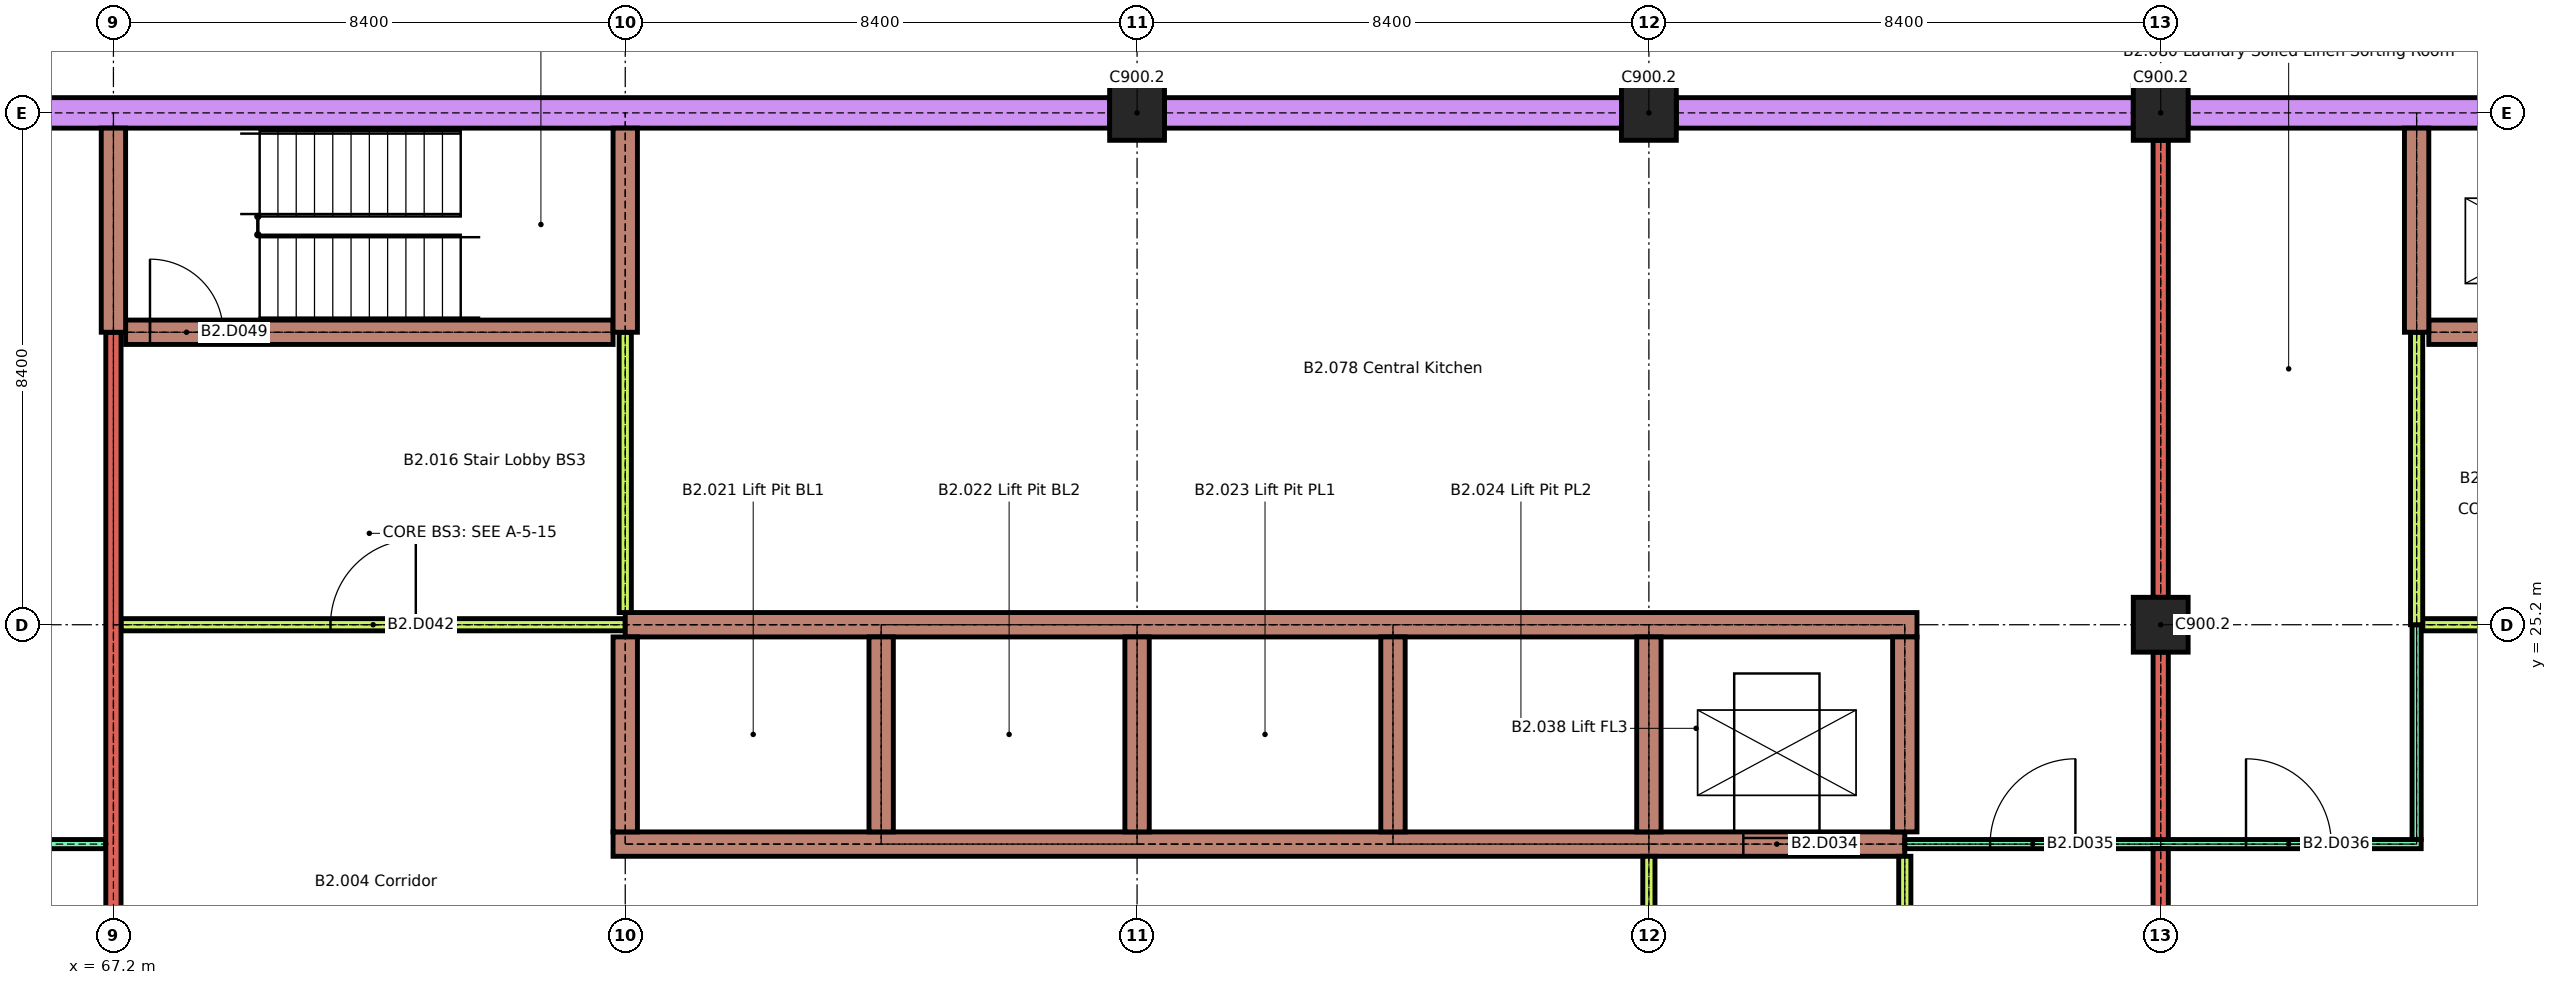
"""IFC4 building model, lengths in metres.
Left out: names, types, materials, properties, quantities, classifications, styles, units other than length and angle.
Written with IfcOpenShell. Run it as: python <this file> out.ifc"""

import sys

from ifc_helpers import new_model, si_unit, direction, frame, frame_2d, origin, origin_2d, place, context, subcontext, project, spatial, rectangle, extrude, element, fill, save


model = new_model("IFC4")
c1 = context("Model", 3, precision=1e-05, world=origin(), true_north=direction((0.0, 1.0)))
c2 = subcontext(c1, "Body", "Model", "MODEL_VIEW")
j1 = project(units=[si_unit("LENGTHUNIT", "METRE"), si_unit("PLANEANGLEUNIT", "RADIAN")], contexts=[c1])
p1 = place(None, origin())
s1 = spatial("IfcSite", under=j1, at=p1, CompositionType="ELEMENT")
p2 = place(p1, origin())
s2 = spatial("IfcBuilding", under=s1, at=p2, CompositionType="ELEMENT")
p3 = place(p2, frame((0.0, 0.0, -7.8)))
s3 = spatial("IfcBuildingStorey", under=s2, at=p3, CompositionType="ELEMENT", Elevation=-7.8)
for number, where, z_axis, x_axis in (
    (1, (100.8, 25.2, 0.0), (0.0, 0.0, 1.0), (1.0, 0.0, 0.0)),
    (2, (84.0, 33.6, 0.0), (0.0, 0.0, 1.0), (1.0, 0.0, 0.0)),
    (3, (92.4, 33.6, 0.0), (0.0, 0.0, 1.0), (1.0, 0.0, 0.0)),
    (4, (100.8, 33.6, 0.0), (0.0, 0.0, 1.0), (1.0, 0.0, 0.0)),
):
    element("IfcColumn", number, at=place(p3, frame(where, z_axis=z_axis, x_axis=x_axis)), inside=s3, PredefinedType="COLUMN", context=c2, shape_type="SweptSolid", body=[
        extrude(rectangle(XDim=0.9, YDim=0.9, at=origin_2d()), origin(), (0.0, 0.0, 1.0), 3.1),
    ])
p4 = place(p3, frame((42.45, 33.6, 0.0), z_axis=(0.0, 0.0, 1.0), x_axis=(1.0, 0.0, 0.0)))
e5 = element("IfcWall", 5, at=p4, inside=s3, PredefinedType="SOLIDWALL", context=c2, shape_type="SweptSolid", body=[
    extrude(rectangle(XDim=41.1, YDim=0.5, at=frame_2d((20.55, 0.0))), origin(), (0.0, 0.0, 1.0), 3.1),
])
for number, where, z_axis, x_axis in (
    (6, (84.45, 33.6, 0.0), (0.0, 0.0, 1.0), (1.0, 0.0, 0.0)),
    (7, (92.85, 33.6, 0.0), (0.0, 0.0, 1.0), (1.0, 0.0, 0.0)),
):
    element("IfcWall", number, at=place(p3, frame(where, z_axis=z_axis, x_axis=x_axis)), inside=s3, PredefinedType="SOLIDWALL", context=c2, shape_type="SweptSolid", body=[
        extrude(rectangle(XDim=7.5, YDim=0.5, at=frame_2d((3.75, 0.0))), origin(), (0.0, 0.0, 1.0), 3.1),
    ])
p5 = place(p3, frame((101.25, 33.6, 0.0), z_axis=(0.0, 0.0, 1.0), x_axis=(1.0, 0.0, 0.0)))
e8 = element("IfcWall", 8, at=p5, inside=s3, PredefinedType="SOLIDWALL", context=c2, shape_type="SweptSolid", body=[
    extrude(rectangle(XDim=32.7, YDim=0.5, at=frame_2d((16.35, 0.0))), origin(), (0.0, 0.0, 1.0), 3.1),
])
p6 = place(p3, frame((58.725, 21.6, 0.0), z_axis=(0.0, 0.0, 1.0), x_axis=(1.0, 0.0, 0.0)))
e9 = element("IfcWall", 9, at=p6, inside=s3, PredefinedType="PARTITIONING", context=c2, shape_type="SweptSolid", body=[
    extrude(rectangle(XDim=8.35, YDim=0.15, at=frame_2d((4.175, 0.0))), origin(), (0.0, 0.0, 1.0), 3.1),
])
p7 = place(p6, frame((3.512, 0.0, 0.0)))
e10 = element("IfcOpeningElement", 10, at=p7, cuts=e9, PredefinedType="OPENING", context=c2, shape_type="SweptSolid", body=[
    extrude(rectangle(XDim=1.4, YDim=2.1, at=frame_2d((0.7, 1.05))), frame((0.0, 0.085, 0.0), z_axis=(0.0, -1.0, 0.0), x_axis=(1.0, 0.0, 0.0)), (0.0, 0.0, 1.0), 0.17),
])
p8 = place(p3, frame((75.4, 21.6, 0.0), z_axis=(0.0, 0.0, 1.0), x_axis=(1.0, 0.0, 0.0)))
e11 = element("IfcWall", 11, at=p8, inside=s3, PredefinedType="SHEAR", context=c2, shape_type="SweptSolid", body=[
    extrude(rectangle(XDim=21.2, YDim=0.4, at=frame_2d((10.6, 0.0))), origin(), (0.0, 0.0, 1.0), 3.1),
])
p9 = place(p8, frame((18.55, 0.0, 0.0)))
e12 = element("IfcOpeningElement", 12, at=p9, cuts=e11, PredefinedType="OPENING", context=c2, shape_type="SweptSolid", body=[
    extrude(rectangle(XDim=1.1, YDim=2.1, at=frame_2d((0.55, 1.05))), frame((0.0, 0.21, 0.0), z_axis=(0.0, -1.0, 0.0), x_axis=(1.0, 0.0, 0.0)), (0.0, 0.0, 1.0), 0.42),
])
p10 = place(p3, frame((96.6, 21.6, 0.0), z_axis=(0.0, 0.0, 1.0), x_axis=(1.0, 0.0, 0.0)))
e13 = element("IfcWall", 13, at=p10, inside=s3, PredefinedType="PARTITIONING", context=c2, shape_type="SweptSolid", body=[
    extrude(rectangle(XDim=8.475, YDim=0.15, at=frame_2d((4.237, 0.0))), origin(), (0.0, 0.0, 1.0), 3.1),
])
p11 = place(p10, frame((1.4, 0.0, 0.0)))
e14 = element("IfcOpeningElement", 14, at=p11, cuts=e13, PredefinedType="OPENING", context=c2, shape_type="SweptSolid", body=[
    extrude(rectangle(XDim=1.4, YDim=2.1, at=frame_2d((0.7, 1.05))), frame((0.0, 0.085, 0.0), z_axis=(0.0, -1.0, 0.0), x_axis=(1.0, 0.0, 0.0)), (0.0, 0.0, 1.0), 0.17),
])
p12 = place(p10, frame((5.6, 0.0, 0.0)))
e15 = element("IfcOpeningElement", 15, at=p12, cuts=e13, PredefinedType="OPENING", context=c2, shape_type="SweptSolid", body=[
    extrude(rectangle(XDim=1.4, YDim=2.1, at=frame_2d((0.7, 1.05))), frame((0.0, 0.085, 0.0), z_axis=(0.0, -1.0, 0.0), x_axis=(1.0, 0.0, 0.0)), (0.0, 0.0, 1.0), 0.17),
])
p13 = place(p3, frame((67.325, 25.2, 0.0), z_axis=(0.0, 0.0, 1.0), x_axis=(1.0, 0.0, 0.0)))
e16 = element("IfcWall", 16, at=p13, inside=s3, PredefinedType="PARTITIONING", context=c2, shape_type="SweptSolid", body=[
    extrude(rectangle(XDim=8.275, YDim=0.2, at=frame_2d((4.138, 0.0))), origin(), (0.0, 0.0, 1.0), 3.1),
])
p14 = place(p13, frame((3.438, 0.0, 0.0)))
e17 = element("IfcOpeningElement", 17, at=p14, cuts=e16, PredefinedType="OPENING", context=c2, shape_type="SweptSolid", body=[
    extrude(rectangle(XDim=1.4, YDim=2.1, at=frame_2d((0.7, 1.05))), frame((0.0, 0.11, 0.0), z_axis=(0.0, -1.0, 0.0), x_axis=(1.0, 0.0, 0.0)), (0.0, 0.0, 1.0), 0.22),
])
p15 = place(p3, frame((75.6, 25.2, 0.0), z_axis=(0.0, 0.0, 1.0), x_axis=(1.0, 0.0, 0.0)))
e18 = element("IfcWall", 18, at=p15, inside=s3, PredefinedType="SHEAR", context=c2, shape_type="SweptSolid", body=[
    extrude(rectangle(XDim=21.2, YDim=0.4, at=frame_2d((10.6, 0.0))), origin(), (0.0, 0.0, 1.0), 3.1),
])
p16 = place(p3, frame((105.1, 25.2, 0.0), z_axis=(0.0, 0.0, 1.0), x_axis=(1.0, 0.0, 0.0)))
e19 = element("IfcWall", 19, at=p16, inside=s3, PredefinedType="PARTITIONING", context=c2, shape_type="SweptSolid", body=[
    extrude(rectangle(XDim=4.0, YDim=0.2, at=frame_2d((2.0, 0.0))), origin(), (0.0, 0.0, 1.0), 3.1),
])
p17 = place(p16, frame((1.0, 0.0, 0.0)))
e20 = element("IfcOpeningElement", 20, at=p17, cuts=e19, PredefinedType="OPENING", context=c2, shape_type="SweptSolid", body=[
    extrude(rectangle(XDim=2.0, YDim=2.4, at=frame_2d((1.0, 1.2))), frame((0.0, 0.11, 0.0), z_axis=(0.0, -1.0, 0.0), x_axis=(1.0, 0.0, 0.0)), (0.0, 0.0, 1.0), 0.22),
])
p18 = place(p3, frame((67.4, 30.0, 0.0), z_axis=(0.0, 0.0, 1.0), x_axis=(1.0, 0.0, 0.0)))
e21 = element("IfcWall", 21, at=p18, inside=s3, PredefinedType="SHEAR", context=c2, shape_type="SweptSolid", body=[
    extrude(rectangle(XDim=8.0, YDim=0.4, at=frame_2d((4.0, 0.0))), origin(), (0.0, 0.0, 1.0), 3.1),
])
p19 = place(p18, frame((0.4, 0.0, 0.0)))
e22 = element("IfcOpeningElement", 22, at=p19, cuts=e21, PredefinedType="OPENING", context=c2, shape_type="SweptSolid", body=[
    extrude(rectangle(XDim=1.2, YDim=2.1, at=frame_2d((0.6, 1.05))), frame((0.0, 0.21, 0.0), z_axis=(0.0, -1.0, 0.0), x_axis=(1.0, 0.0, 0.0)), (0.0, 0.0, 1.0), 0.42),
])
p20 = place(p3, frame((105.2, 30.0, 0.0), z_axis=(0.0, 0.0, 1.0), x_axis=(1.0, 0.0, 0.0)))
e23 = element("IfcWall", 23, at=p20, inside=s3, PredefinedType="SHEAR", context=c2, shape_type="SweptSolid", body=[
    extrude(rectangle(XDim=3.8, YDim=0.4, at=frame_2d((1.9, 0.0))), origin(), (0.0, 0.0, 1.0), 3.1),
])
p21 = place(p20, frame((1.35, 0.0, 0.0)))
e24 = element("IfcOpeningElement", 24, at=p21, cuts=e23, PredefinedType="OPENING", context=c2, shape_type="SweptSolid", body=[
    extrude(rectangle(XDim=1.1, YDim=2.1, at=frame_2d((0.55, 1.05))), frame((0.0, 0.21, 0.0), z_axis=(0.0, -1.0, 0.0), x_axis=(1.0, 0.0, 0.0)), (0.0, 0.0, 1.0), 0.42),
])
p22 = place(p3, frame((67.2, 17.25, 0.0), z_axis=(0.0, 0.0, 1.0), x_axis=(0.0, 1.0, 0.0)))
e25 = element("IfcWall", 25, at=p22, inside=s3, PredefinedType="SOLIDWALL", context=c2, shape_type="SweptSolid", body=[
    extrude(rectangle(XDim=12.75, YDim=0.25, at=frame_2d((6.375, 0.0))), origin(), (0.0, 0.0, 1.0), 3.1),
])
p23 = place(p22, frame((1.175, 0.0, 0.0)))
e26 = element("IfcOpeningElement", 26, at=p23, cuts=e25, PredefinedType="OPENING", context=c2, shape_type="SweptSolid", body=[
    extrude(rectangle(XDim=2.0, YDim=2.4, at=frame_2d((1.0, 1.2))), frame((0.0, 0.135, 0.0), z_axis=(0.0, -1.0, 0.0), x_axis=(1.0, 0.0, 0.0)), (0.0, 0.0, 1.0), 0.27),
])
p24 = place(p3, frame((67.2, 30.0, 0.0), z_axis=(0.0, 0.0, 1.0), x_axis=(0.0, 1.0, 0.0)))
e27 = element("IfcWall", 27, at=p24, inside=s3, PredefinedType="SHEAR", context=c2, shape_type="SweptSolid", body=[
    extrude(rectangle(XDim=3.35, YDim=0.4, at=frame_2d((1.675, 0.0))), origin(), (0.0, 0.0, 1.0), 3.1),
])
p25 = place(p3, frame((75.6, 21.8, 0.0), z_axis=(0.0, 0.0, 1.0), x_axis=(0.0, 1.0, 0.0)))
e28 = element("IfcWall", 28, at=p25, inside=s3, PredefinedType="SHEAR", context=c2, shape_type="SweptSolid", body=[
    extrude(rectangle(XDim=3.2, YDim=0.4, at=frame_2d((1.6, 0.0))), origin(), (0.0, 0.0, 1.0), 3.1),
])
p26 = place(p3, frame((75.6, 25.4, 0.0), z_axis=(0.0, 0.0, 1.0), x_axis=(0.0, 1.0, 0.0)))
e29 = element("IfcWall", 29, at=p26, inside=s3, PredefinedType="PARTITIONING", context=c2, shape_type="SweptSolid", body=[
    extrude(rectangle(XDim=4.6, YDim=0.2, at=frame_2d((2.3, 0.0))), origin(), (0.0, 0.0, 1.0), 3.1),
])
p27 = place(p3, frame((75.6, 30.0, 0.0), z_axis=(0.0, 0.0, 1.0), x_axis=(0.0, 1.0, 0.0)))
e30 = element("IfcWall", 30, at=p27, inside=s3, PredefinedType="SHEAR", context=c2, shape_type="SweptSolid", body=[
    extrude(rectangle(XDim=3.35, YDim=0.4, at=frame_2d((1.675, 0.0))), origin(), (0.0, 0.0, 1.0), 3.1),
])
for number, where, z_axis, x_axis in (
    (31, (79.8, 21.8, 0.0), (0.0, 0.0, 1.0), (0.0, 1.0, 0.0)),
    (32, (84.0, 21.8, 0.0), (0.0, 0.0, 1.0), (0.0, 1.0, 0.0)),
    (33, (88.2, 21.8, 0.0), (0.0, 0.0, 1.0), (0.0, 1.0, 0.0)),
):
    element("IfcWall", number, at=place(p3, frame(where, z_axis=z_axis, x_axis=x_axis)), inside=s3, PredefinedType="SHEAR", context=c2, shape_type="SweptSolid", body=[
        extrude(rectangle(XDim=3.2, YDim=0.4, at=frame_2d((1.6, 0.0))), origin(), (0.0, 0.0, 1.0), 3.1),
    ])
p28 = place(p3, frame((92.4, 16.9, 0.0), z_axis=(0.0, 0.0, 1.0), x_axis=(0.0, 1.0, 0.0)))
e34 = element("IfcWall", 34, at=p28, inside=s3, PredefinedType="PARTITIONING", context=c2, shape_type="SweptSolid", body=[
    extrude(rectangle(XDim=4.5, YDim=0.2, at=frame_2d((2.25, 0.0))), origin(), (0.0, 0.0, 1.0), 3.1),
])
p29 = place(p28, frame((1.25, 0.0, 0.0)))
e35 = element("IfcOpeningElement", 35, at=p29, cuts=e34, PredefinedType="OPENING", context=c2, shape_type="SweptSolid", body=[
    extrude(rectangle(XDim=2.0, YDim=2.4, at=frame_2d((1.0, 1.2))), frame((0.0, 0.11, 0.0), z_axis=(0.0, -1.0, 0.0), x_axis=(1.0, 0.0, 0.0)), (0.0, 0.0, 1.0), 0.22),
])
p30 = place(p3, frame((92.4, 21.8, 0.0), z_axis=(0.0, 0.0, 1.0), x_axis=(0.0, 1.0, 0.0)))
e36 = element("IfcWall", 36, at=p30, inside=s3, PredefinedType="SHEAR", context=c2, shape_type="SweptSolid", body=[
    extrude(rectangle(XDim=3.2, YDim=0.4, at=frame_2d((1.6, 0.0))), origin(), (0.0, 0.0, 1.0), 3.1),
])
p31 = place(p3, frame((96.6, 16.9, 0.0), z_axis=(0.0, 0.0, 1.0), x_axis=(0.0, 1.0, 0.0)))
e37 = element("IfcWall", 37, at=p31, inside=s3, PredefinedType="PARTITIONING", context=c2, shape_type="SweptSolid", body=[
    extrude(rectangle(XDim=4.5, YDim=0.2, at=frame_2d((2.25, 0.0))), origin(), (0.0, 0.0, 1.0), 3.1),
])
p32 = place(p31, frame((1.25, 0.0, 0.0)))
e38 = element("IfcOpeningElement", 38, at=p32, cuts=e37, PredefinedType="OPENING", context=c2, shape_type="SweptSolid", body=[
    extrude(rectangle(XDim=2.0, YDim=2.4, at=frame_2d((1.0, 1.2))), frame((0.0, 0.11, 0.0), z_axis=(0.0, -1.0, 0.0), x_axis=(1.0, 0.0, 0.0)), (0.0, 0.0, 1.0), 0.22),
])
p33 = place(p3, frame((96.6, 21.8, 0.0), z_axis=(0.0, 0.0, 1.0), x_axis=(0.0, 1.0, 0.0)))
e39 = element("IfcWall", 39, at=p33, inside=s3, PredefinedType="SHEAR", context=c2, shape_type="SweptSolid", body=[
    extrude(rectangle(XDim=3.2, YDim=0.4, at=frame_2d((1.6, 0.0))), origin(), (0.0, 0.0, 1.0), 3.1),
])
p34 = place(p3, frame((100.8, 17.25, 0.0), z_axis=(0.0, 0.0, 1.0), x_axis=(0.0, 1.0, 0.0)))
e40 = element("IfcWall", 40, at=p34, inside=s3, PredefinedType="SOLIDWALL", context=c2, shape_type="SweptSolid", body=[
    extrude(rectangle(XDim=4.275, YDim=0.25, at=frame_2d((2.137, 0.0))), origin(), (0.0, 0.0, 1.0), 3.1),
])
p35 = place(p34, frame((1.137, 0.0, 0.0)))
e41 = element("IfcOpeningElement", 41, at=p35, cuts=e40, PredefinedType="OPENING", context=c2, shape_type="SweptSolid", body=[
    extrude(rectangle(XDim=2.0, YDim=2.4, at=frame_2d((1.0, 1.2))), frame((0.0, 0.135, 0.0), z_axis=(0.0, -1.0, 0.0), x_axis=(1.0, 0.0, 0.0)), (0.0, 0.0, 1.0), 0.27),
])
p36 = place(p3, frame((100.8, 21.675, 0.0), z_axis=(0.0, 0.0, 1.0), x_axis=(0.0, 1.0, 0.0)))
e42 = element("IfcWall", 42, at=p36, inside=s3, PredefinedType="SOLIDWALL", context=c2, shape_type="SweptSolid", body=[
    extrude(rectangle(XDim=3.075, YDim=0.25, at=frame_2d((1.538, 0.0))), origin(), (0.0, 0.0, 1.0), 3.1),
])
p37 = place(p3, frame((100.8, 25.65, 0.0), z_axis=(0.0, 0.0, 1.0), x_axis=(0.0, 1.0, 0.0)))
e43 = element("IfcWall", 43, at=p37, inside=s3, PredefinedType="SOLIDWALL", context=c2, shape_type="SweptSolid", body=[
    extrude(rectangle(XDim=7.5, YDim=0.25, at=frame_2d((3.75, 0.0))), origin(), (0.0, 0.0, 1.0), 3.1),
])
p38 = place(p3, frame((105.0, 21.675, 0.0), z_axis=(0.0, 0.0, 1.0), x_axis=(0.0, 1.0, 0.0)))
e44 = element("IfcWall", 44, at=p38, inside=s3, PredefinedType="PARTITIONING", context=c2, shape_type="SweptSolid", body=[
    extrude(rectangle(XDim=3.525, YDim=0.15, at=frame_2d((1.762, 0.0))), origin(), (0.0, 0.0, 1.0), 3.1),
])
p39 = place(p3, frame((105.0, 25.2, 0.0), z_axis=(0.0, 0.0, 1.0), x_axis=(0.0, 1.0, 0.0)))
e45 = element("IfcWall", 45, at=p39, inside=s3, PredefinedType="PARTITIONING", context=c2, shape_type="SweptSolid", body=[
    extrude(rectangle(XDim=4.8, YDim=0.2, at=frame_2d((2.4, 0.0))), origin(), (0.0, 0.0, 1.0), 3.1),
])
p40 = place(p3, frame((105.0, 30.0, 0.0), z_axis=(0.0, 0.0, 1.0), x_axis=(0.0, 1.0, 0.0)))
e46 = element("IfcWall", 46, at=p40, inside=s3, PredefinedType="SHEAR", context=c2, shape_type="SweptSolid", body=[
    extrude(rectangle(XDim=3.35, YDim=0.4, at=frame_2d((1.675, 0.0))), origin(), (0.0, 0.0, 1.0), 3.1),
])
p41 = place(p9, origin())
e47 = element("IfcDoor", 47, at=p41, inside=s3, OperationType="SLIDING_TO_LEFT", PredefinedType="DOOR", context=c2, shape_type="SweptSolid", body=[
    extrude(rectangle(XDim=1.1, YDim=2.1, at=frame_2d((0.55, 1.05))), frame((0.0, 0.025, 0.0), z_axis=(0.0, -1.0, 0.0), x_axis=(1.0, 0.0, 0.0)), (0.0, 0.0, 1.0), 0.05),
])
fill(e12, e47)
p42 = place(p11, origin())
e48 = element("IfcDoor", 48, at=p42, inside=s3, OperationType="SINGLE_SWING_LEFT", PredefinedType="DOOR", context=c2, shape_type="SweptSolid", body=[
    extrude(rectangle(XDim=1.4, YDim=2.1, at=frame_2d((0.7, 1.05))), frame((0.0, 0.025, 0.0), z_axis=(0.0, -1.0, 0.0), x_axis=(1.0, 0.0, 0.0)), (0.0, 0.0, 1.0), 0.05),
])
fill(e14, e48)
p43 = place(p12, origin())
e49 = element("IfcDoor", 49, at=p43, inside=s3, OperationType="SINGLE_SWING_RIGHT", PredefinedType="DOOR", context=c2, shape_type="SweptSolid", body=[
    extrude(rectangle(XDim=1.4, YDim=2.1, at=frame_2d((0.7, 1.05))), frame((0.0, 0.025, 0.0), z_axis=(0.0, -1.0, 0.0), x_axis=(1.0, 0.0, 0.0)), (0.0, 0.0, 1.0), 0.05),
])
fill(e15, e49)
p44 = place(p14, origin())
e50 = element("IfcDoor", 50, at=p44, inside=s3, OperationType="SINGLE_SWING_LEFT", PredefinedType="DOOR", context=c2, shape_type="SweptSolid", body=[
    extrude(rectangle(XDim=1.4, YDim=2.1, at=frame_2d((0.7, 1.05))), frame((0.0, 0.03, 0.0), z_axis=(0.0, -1.0, 0.0), x_axis=(1.0, 0.0, 0.0)), (0.0, 0.0, 1.0), 0.06),
])
fill(e17, e50)
p45 = place(p19, origin())
e51 = element("IfcDoor", 51, at=p45, inside=s3, OperationType="SINGLE_SWING_RIGHT", PredefinedType="DOOR", context=c2, shape_type="SweptSolid", body=[
    extrude(rectangle(XDim=1.2, YDim=2.1, at=frame_2d((0.6, 1.05))), frame((0.0, 0.025, 0.0), z_axis=(0.0, -1.0, 0.0), x_axis=(1.0, 0.0, 0.0)), (0.0, 0.0, 1.0), 0.05),
])
fill(e22, e51)
save(model, sys.argv[1])
